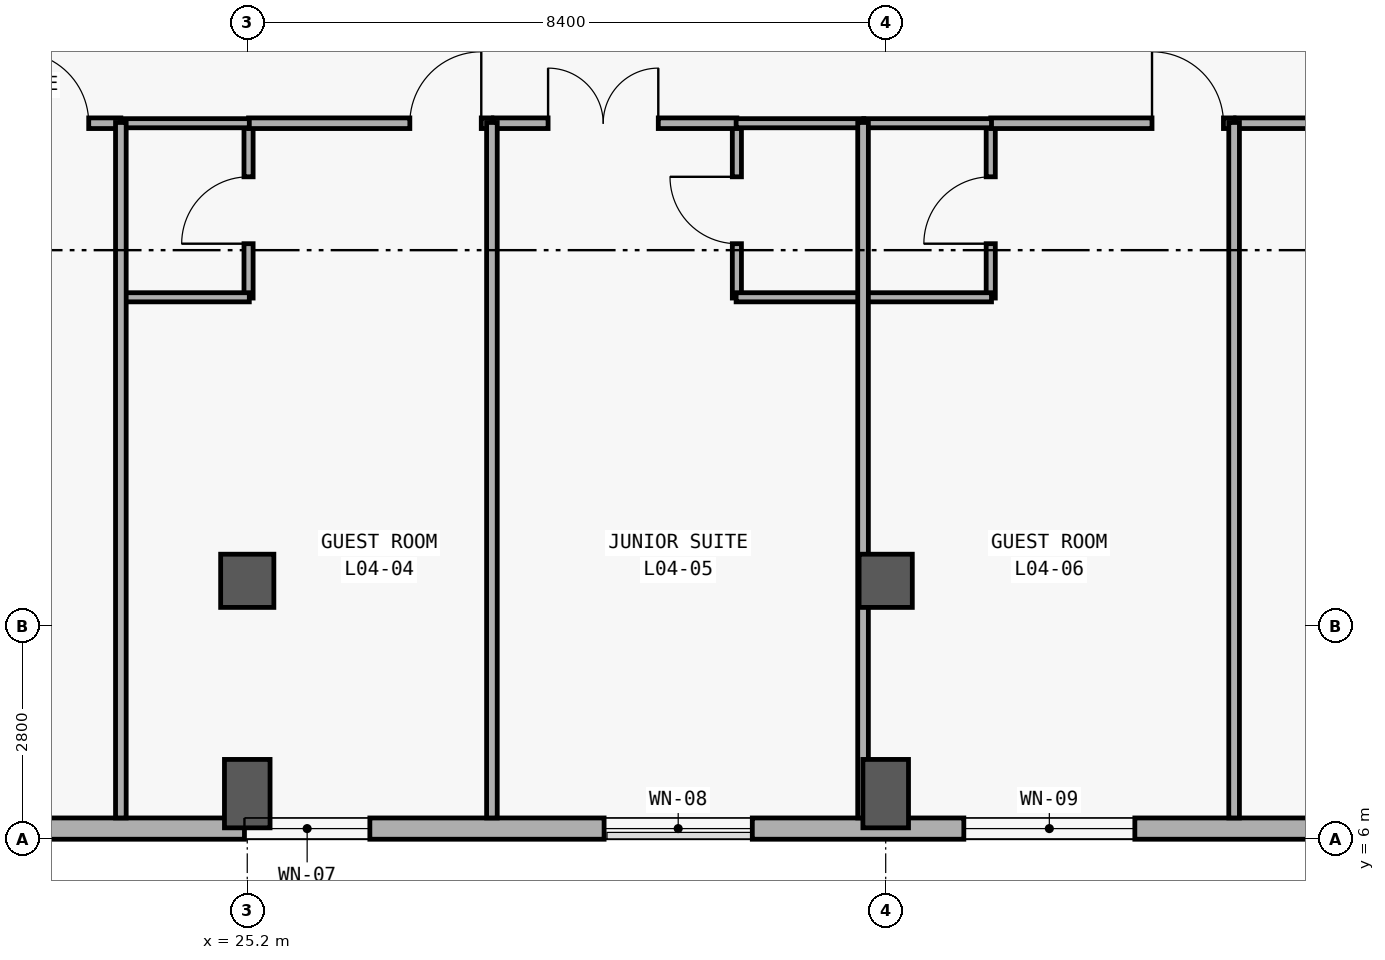
"""IFC4 building model, lengths in metres.
Left out: names, types, materials, properties, quantities, classifications, styles, units other than length and angle.
Written with IfcOpenShell. Run it as: python <this file> out.ifc"""

import sys

from ifc_helpers import new_model, si_unit, direction, frame, frame_2d, origin, origin_2d, place, context, subcontext, project, spatial, rectangle, extrude, element, fill, save


model = new_model("IFC4")
c1 = context("Model", 3, precision=1e-05, world=origin(), true_north=direction((0.0, 1.0)))
c2 = subcontext(c1, "Body", "Model", "MODEL_VIEW")
j1 = project(units=[si_unit("LENGTHUNIT", "METRE"), si_unit("PLANEANGLEUNIT", "RADIAN")], contexts=[c1])
p1 = place(None, origin())
s1 = spatial("IfcSite", under=j1, at=p1, CompositionType="ELEMENT")
p2 = place(p1, origin())
s2 = spatial("IfcBuilding", under=s1, at=p2, CompositionType="ELEMENT")
p3 = place(p2, frame((0.0, 0.0, 19.2)))
s3 = spatial("IfcBuildingStorey", under=s2, at=p3, CompositionType="ELEMENT", Elevation=19.2)
p4 = place(p3, frame((25.2, 6.6, 0.0), z_axis=(0.0, 0.0, 1.0), x_axis=(0.0, 1.0, 0.0)))
e1 = element("IfcColumn", 1, at=p4, inside=s3, PredefinedType="COLUMN", context=c2, shape_type="SweptSolid", body=[
    extrude(rectangle(XDim=0.6, YDim=0.9, at=origin_2d()), origin(), (0.0, 0.0, 1.0), 3.6),
])
p5 = place(p3, frame((25.2, 9.4, 0.0), z_axis=(0.0, 0.0, 1.0), x_axis=(1.0, 0.0, 0.0)))
e2 = element("IfcColumn", 2, at=p5, inside=s3, PredefinedType="COLUMN", context=c2, shape_type="SweptSolid", body=[
    extrude(rectangle(XDim=0.7, YDim=0.7, at=origin_2d()), origin(), (0.0, 0.0, 1.0), 3.6),
])
p6 = place(p3, frame((33.6, 6.6, 0.0), z_axis=(0.0, 0.0, 1.0), x_axis=(0.0, 1.0, 0.0)))
e3 = element("IfcColumn", 3, at=p6, inside=s3, PredefinedType="COLUMN", context=c2, shape_type="SweptSolid", body=[
    extrude(rectangle(XDim=0.6, YDim=0.9, at=origin_2d()), origin(), (0.0, 0.0, 1.0), 3.6),
])
p7 = place(p3, frame((33.6, 9.4, 0.0), z_axis=(0.0, 0.0, 1.0), x_axis=(1.0, 0.0, 0.0)))
e4 = element("IfcColumn", 4, at=p7, inside=s3, PredefinedType="COLUMN", context=c2, shape_type="SweptSolid", body=[
    extrude(rectangle(XDim=0.7, YDim=0.7, at=origin_2d()), origin(), (0.0, 0.0, 1.0), 3.6),
])
p8 = place(p3, frame((92.12, 6.14, 0.0), z_axis=(0.0, 0.0, 1.0), x_axis=(-1.0, 0.0, 0.0)))
e5 = element("IfcWall", 5, at=p8, inside=s3, PredefinedType="SOLIDWALL", context=c2, shape_type="SweptSolid", body=[
    extrude(rectangle(XDim=83.44, YDim=0.28, at=frame_2d((41.72, 0.0))), origin(), (0.0, 0.0, 1.0), 3.32),
])
p9 = place(p8, frame((79.429, 0.0, 0.85)))
e6 = element("IfcOpeningElement", 6, at=p9, cuts=e5, PredefinedType="OPENING", context=c2, shape_type="SweptSolid", body=[
    extrude(rectangle(XDim=2.7, YDim=1.85, at=frame_2d((1.35, 0.925))), frame((0.0, 0.15, 0.0), z_axis=(0.0, -1.0, 0.0), x_axis=(1.0, 0.0, 0.0)), (0.0, 0.0, 1.0), 0.3),
])
p10 = place(p8, frame((74.397, 0.0, 0.85)))
e7 = element("IfcOpeningElement", 7, at=p10, cuts=e5, PredefinedType="OPENING", context=c2, shape_type="SweptSolid", body=[
    extrude(rectangle(XDim=3.0, YDim=1.9, at=frame_2d((1.5, 0.95))), frame((0.0, 0.15, 0.0), z_axis=(0.0, -1.0, 0.0), x_axis=(1.0, 0.0, 0.0)), (0.0, 0.0, 1.0), 0.3),
])
p11 = place(p8, frame((70.264, 0.0, 0.85)))
e8 = element("IfcOpeningElement", 8, at=p11, cuts=e5, PredefinedType="OPENING", context=c2, shape_type="SweptSolid", body=[
    extrude(rectangle(XDim=1.5, YDim=1.75, at=frame_2d((0.75, 0.875))), frame((0.0, 0.15, 0.0), z_axis=(0.0, -1.0, 0.0), x_axis=(1.0, 0.0, 0.0)), (0.0, 0.0, 1.0), 0.3),
])
p12 = place(p8, frame((65.307, 0.0, 0.85)))
e9 = element("IfcOpeningElement", 9, at=p12, cuts=e5, PredefinedType="OPENING", context=c2, shape_type="SweptSolid", body=[
    extrude(rectangle(XDim=1.65, YDim=1.75, at=frame_2d((0.825, 0.875))), frame((0.0, 0.15, 0.0), z_axis=(0.0, -1.0, 0.0), x_axis=(1.0, 0.0, 0.0)), (0.0, 0.0, 1.0), 0.3),
])
p13 = place(p8, frame((60.275, 0.0, 0.85)))
e10 = element("IfcOpeningElement", 10, at=p13, cuts=e5, PredefinedType="OPENING", context=c2, shape_type="SweptSolid", body=[
    extrude(rectangle(XDim=1.95, YDim=1.75, at=frame_2d((0.975, 0.875))), frame((0.0, 0.15, 0.0), z_axis=(0.0, -1.0, 0.0), x_axis=(1.0, 0.0, 0.0)), (0.0, 0.0, 1.0), 0.3),
])
p14 = place(p8, frame((55.242, 0.0, 0.85)))
e11 = element("IfcOpeningElement", 11, at=p14, cuts=e5, PredefinedType="OPENING", context=c2, shape_type="SweptSolid", body=[
    extrude(rectangle(XDim=2.25, YDim=1.75, at=frame_2d((1.125, 0.875))), frame((0.0, 0.15, 0.0), z_axis=(0.0, -1.0, 0.0), x_axis=(1.0, 0.0, 0.0)), (0.0, 0.0, 1.0), 0.3),
])
p15 = place(p8, frame((50.21, 0.0, 0.85)))
e12 = element("IfcOpeningElement", 12, at=p15, cuts=e5, PredefinedType="OPENING", context=c2, shape_type="SweptSolid", body=[
    extrude(rectangle(XDim=2.55, YDim=1.8, at=frame_2d((1.275, 0.9))), frame((0.0, 0.15, 0.0), z_axis=(0.0, -1.0, 0.0), x_axis=(1.0, 0.0, 0.0)), (0.0, 0.0, 1.0), 0.3),
])
p16 = place(p8, frame((45.178, 0.0, 0.85)))
e13 = element("IfcOpeningElement", 13, at=p16, cuts=e5, PredefinedType="OPENING", context=c2, shape_type="SweptSolid", body=[
    extrude(rectangle(XDim=2.85, YDim=1.85, at=frame_2d((1.425, 0.925))), frame((0.0, 0.15, 0.0), z_axis=(0.0, -1.0, 0.0), x_axis=(1.0, 0.0, 0.0)), (0.0, 0.0, 1.0), 0.3),
])
p17 = place(p8, frame((40.12, 0.0, 0.85)))
e14 = element("IfcOpeningElement", 14, at=p17, cuts=e5, PredefinedType="OPENING", context=c2, shape_type="SweptSolid", body=[
    extrude(rectangle(XDim=3.2, YDim=1.95, at=frame_2d((1.6, 0.975))), frame((0.0, 0.15, 0.0), z_axis=(0.0, -1.0, 0.0), x_axis=(1.0, 0.0, 0.0)), (0.0, 0.0, 1.0), 0.3),
])
p18 = place(p8, frame((35.088, 0.0, 0.85)))
e15 = element("IfcOpeningElement", 15, at=p18, cuts=e5, PredefinedType="OPENING", context=c2, shape_type="SweptSolid", body=[
    extrude(rectangle(XDim=3.5, YDim=2.0, at=frame_2d((1.75, 1.0))), frame((0.0, 0.15, 0.0), z_axis=(0.0, -1.0, 0.0), x_axis=(1.0, 0.0, 0.0)), (0.0, 0.0, 1.0), 0.3),
])
p19 = place(p8, frame((31.255, 0.0, 0.85)))
e16 = element("IfcOpeningElement", 16, at=p19, cuts=e5, PredefinedType="OPENING", context=c2, shape_type="SweptSolid", body=[
    extrude(rectangle(XDim=1.4, YDim=1.6, at=frame_2d((0.7, 0.8))), frame((0.0, 0.15, 0.0), z_axis=(0.0, -1.0, 0.0), x_axis=(1.0, 0.0, 0.0)), (0.0, 0.0, 1.0), 0.3),
])
p20 = place(p8, frame((26.273, 0.0, 0.85)))
e17 = element("IfcOpeningElement", 17, at=p20, cuts=e5, PredefinedType="OPENING", context=c2, shape_type="SweptSolid", body=[
    extrude(rectangle(XDim=1.6, YDim=1.6, at=frame_2d((0.8, 0.8))), frame((0.0, 0.15, 0.0), z_axis=(0.0, -1.0, 0.0), x_axis=(1.0, 0.0, 0.0)), (0.0, 0.0, 1.0), 0.3),
])
p21 = place(p8, frame((21.291, 0.0, 0.85)))
e18 = element("IfcOpeningElement", 18, at=p21, cuts=e5, PredefinedType="OPENING", context=c2, shape_type="SweptSolid", body=[
    extrude(rectangle(XDim=1.8, YDim=1.6, at=frame_2d((0.9, 0.8))), frame((0.0, 0.15, 0.0), z_axis=(0.0, -1.0, 0.0), x_axis=(1.0, 0.0, 0.0)), (0.0, 0.0, 1.0), 0.3),
])
p22 = place(p8, frame((16.308, 0.0, 0.85)))
e19 = element("IfcOpeningElement", 19, at=p22, cuts=e5, PredefinedType="OPENING", context=c2, shape_type="SweptSolid", body=[
    extrude(rectangle(XDim=2.0, YDim=1.65, at=frame_2d((1.0, 0.825))), frame((0.0, 0.15, 0.0), z_axis=(0.0, -1.0, 0.0), x_axis=(1.0, 0.0, 0.0)), (0.0, 0.0, 1.0), 0.3),
])
p23 = place(p8, frame((11.326, 0.0, 0.85)))
e20 = element("IfcOpeningElement", 20, at=p23, cuts=e5, PredefinedType="OPENING", context=c2, shape_type="SweptSolid", body=[
    extrude(rectangle(XDim=2.2, YDim=1.65, at=frame_2d((1.1, 0.825))), frame((0.0, 0.15, 0.0), z_axis=(0.0, -1.0, 0.0), x_axis=(1.0, 0.0, 0.0)), (0.0, 0.0, 1.0), 0.3),
])
p24 = place(p8, frame((6.243, 0.0, 0.85)))
e21 = element("IfcOpeningElement", 21, at=p24, cuts=e5, PredefinedType="OPENING", context=c2, shape_type="SweptSolid", body=[
    extrude(rectangle(XDim=2.6, YDim=2.2, at=frame_2d((1.3, 1.1))), frame((0.0, 0.15, 0.0), z_axis=(0.0, -1.0, 0.0), x_axis=(1.0, 0.0, 0.0)), (0.0, 0.0, 1.0), 0.3),
])
p25 = place(p8, frame((1.111, 0.0, 0.85)))
e22 = element("IfcOpeningElement", 22, at=p25, cuts=e5, PredefinedType="OPENING", context=c2, shape_type="SweptSolid", body=[
    extrude(rectangle(XDim=3.1, YDim=2.2, at=frame_2d((1.55, 1.1))), frame((0.0, 0.15, 0.0), z_axis=(0.0, -1.0, 0.0), x_axis=(1.0, 0.0, 0.0)), (0.0, 0.0, 1.0), 0.3),
])
p26 = place(p3, frame((25.217, 13.12, 0.0), z_axis=(0.0, 0.0, 1.0), x_axis=(0.0, 1.0, 0.0)))
e23 = element("IfcWall", 23, at=p26, inside=s3, PredefinedType="PARTITIONING", context=c2, shape_type="SweptSolid", body=[
    extrude(rectangle(XDim=2.31, YDim=0.12, at=frame_2d((1.155, 0.0))), origin(), (0.0, 0.0, 1.0), 2.48),
])
p27 = place(p26, frame((0.715, 0.0, 0.0)))
e24 = element("IfcOpeningElement", 24, at=p27, cuts=e23, PredefinedType="OPENING", context=c2, shape_type="SweptSolid", body=[
    extrude(rectangle(XDim=0.88, YDim=2.15, at=frame_2d((0.44, 1.075))), frame((0.0, 0.07, 0.0), z_axis=(0.0, -1.0, 0.0), x_axis=(1.0, 0.0, 0.0)), (0.0, 0.0, 1.0), 0.14),
])
p28 = place(p3, frame((31.642, 13.12, 0.0), z_axis=(0.0, 0.0, 1.0), x_axis=(0.0, 1.0, 0.0)))
e25 = element("IfcWall", 25, at=p28, inside=s3, PredefinedType="PARTITIONING", context=c2, shape_type="SweptSolid", body=[
    extrude(rectangle(XDim=2.31, YDim=0.12, at=frame_2d((1.155, 0.0))), origin(), (0.0, 0.0, 1.0), 2.48),
])
p29 = place(p28, frame((0.715, 0.0, 0.0)))
e26 = element("IfcOpeningElement", 26, at=p29, cuts=e25, PredefinedType="OPENING", context=c2, shape_type="SweptSolid", body=[
    extrude(rectangle(XDim=0.88, YDim=2.15, at=frame_2d((0.44, 1.075))), frame((0.0, 0.07, 0.0), z_axis=(0.0, -1.0, 0.0), x_axis=(1.0, 0.0, 0.0)), (0.0, 0.0, 1.0), 0.14),
])
p30 = place(p3, frame((34.982, 13.12, 0.0), z_axis=(0.0, 0.0, 1.0), x_axis=(0.0, 1.0, 0.0)))
e27 = element("IfcWall", 27, at=p30, inside=s3, PredefinedType="PARTITIONING", context=c2, shape_type="SweptSolid", body=[
    extrude(rectangle(XDim=2.31, YDim=0.12, at=frame_2d((1.155, 0.0))), origin(), (0.0, 0.0, 1.0), 2.48),
])
p31 = place(p30, frame((0.715, 0.0, 0.0)))
e28 = element("IfcOpeningElement", 28, at=p31, cuts=e27, PredefinedType="OPENING", context=c2, shape_type="SweptSolid", body=[
    extrude(rectangle(XDim=0.88, YDim=2.15, at=frame_2d((0.44, 1.075))), frame((0.0, 0.07, 0.0), z_axis=(0.0, -1.0, 0.0), x_axis=(1.0, 0.0, 0.0)), (0.0, 0.0, 1.0), 0.14),
])
p32 = place(p3, frame((20.335, 15.42, 0.0), z_axis=(0.0, 0.0, 1.0), x_axis=(1.0, 0.0, 0.0)))
e29 = element("IfcWall", 29, at=p32, inside=s3, PredefinedType="PARTITIONING", context=c2, shape_type="SweptSolid", body=[
    extrude(rectangle(XDim=3.202, YDim=0.14, at=frame_2d((1.601, 0.0))), origin(), (0.0, 0.0, 1.0), 2.48),
])
p33 = place(p32, frame((1.839, 0.0, 0.0)))
e30 = element("IfcOpeningElement", 30, at=p33, cuts=e29, PredefinedType="OPENING", context=c2, shape_type="SweptSolid", body=[
    extrude(rectangle(XDim=0.94, YDim=2.2, at=frame_2d((0.47, 1.1))), frame((0.0, 0.08, 0.0), z_axis=(0.0, -1.0, 0.0), x_axis=(1.0, 0.0, 0.0)), (0.0, 0.0, 1.0), 0.16),
])
p34 = place(p3, frame((25.217, 15.42, 0.0), z_axis=(0.0, 0.0, 1.0), x_axis=(1.0, 0.0, 0.0)))
e31 = element("IfcWall", 31, at=p34, inside=s3, PredefinedType="PARTITIONING", context=c2, shape_type="SweptSolid", body=[
    extrude(rectangle(XDim=3.202, YDim=0.14, at=frame_2d((1.601, 0.0))), origin(), (0.0, 0.0, 1.0), 2.48),
])
p35 = place(p34, frame((2.122, 0.0, 0.0)))
e32 = element("IfcOpeningElement", 32, at=p35, cuts=e31, PredefinedType="OPENING", context=c2, shape_type="SweptSolid", body=[
    extrude(rectangle(XDim=0.94, YDim=2.2, at=frame_2d((0.47, 1.1))), frame((0.0, 0.08, 0.0), z_axis=(0.0, -1.0, 0.0), x_axis=(1.0, 0.0, 0.0)), (0.0, 0.0, 1.0), 0.16),
])
p36 = place(p3, frame((28.439, 15.42, 0.0), z_axis=(0.0, 0.0, 1.0), x_axis=(1.0, 0.0, 0.0)))
e33 = element("IfcWall", 33, at=p36, inside=s3, PredefinedType="PARTITIONING", context=c2, shape_type="SweptSolid", body=[
    extrude(rectangle(XDim=3.203, YDim=0.14, at=frame_2d((1.602, 0.0))), origin(), (0.0, 0.0, 1.0), 2.48),
])
p37 = place(p36, frame((0.719, 0.0, 0.0)))
e34 = element("IfcOpeningElement", 34, at=p37, cuts=e33, PredefinedType="OPENING", context=c2, shape_type="SweptSolid", body=[
    extrude(rectangle(XDim=1.45, YDim=2.3, at=frame_2d((0.725, 1.15))), frame((0.0, 0.08, 0.0), z_axis=(0.0, -1.0, 0.0), x_axis=(1.0, 0.0, 0.0)), (0.0, 0.0, 1.0), 0.16),
])
p38 = place(p3, frame((34.982, 15.42, 0.0), z_axis=(0.0, 0.0, 1.0), x_axis=(1.0, 0.0, 0.0)))
e35 = element("IfcWall", 35, at=p38, inside=s3, PredefinedType="PARTITIONING", context=c2, shape_type="SweptSolid", body=[
    extrude(rectangle(XDim=3.202, YDim=0.14, at=frame_2d((1.601, 0.0))), origin(), (0.0, 0.0, 1.0), 2.48),
])
p39 = place(p38, frame((2.122, 0.0, 0.0)))
e36 = element("IfcOpeningElement", 36, at=p39, cuts=e35, PredefinedType="OPENING", context=c2, shape_type="SweptSolid", body=[
    extrude(rectangle(XDim=0.94, YDim=2.2, at=frame_2d((0.47, 1.1))), frame((0.0, 0.08, 0.0), z_axis=(0.0, -1.0, 0.0), x_axis=(1.0, 0.0, 0.0)), (0.0, 0.0, 1.0), 0.16),
])
p40 = place(p3, frame((38.204, 15.42, 0.0), z_axis=(0.0, 0.0, 1.0), x_axis=(1.0, 0.0, 0.0)))
e37 = element("IfcWall", 37, at=p40, inside=s3, PredefinedType="PARTITIONING", context=c2, shape_type="SweptSolid", body=[
    extrude(rectangle(XDim=3.202, YDim=0.14, at=frame_2d((1.601, 0.0))), origin(), (0.0, 0.0, 1.0), 2.48),
])
p41 = place(p40, frame((0.989, 0.0, 0.0)))
e38 = element("IfcOpeningElement", 38, at=p41, cuts=e37, PredefinedType="OPENING", context=c2, shape_type="SweptSolid", body=[
    extrude(rectangle(XDim=0.94, YDim=2.2, at=frame_2d((0.47, 1.1))), frame((0.0, 0.08, 0.0), z_axis=(0.0, -1.0, 0.0), x_axis=(1.0, 0.0, 0.0)), (0.0, 0.0, 1.0), 0.16),
])
for number, where, z_axis, x_axis in (
    (39, (23.547, 13.13, 0.0), (0.0, 0.0, 1.0), (1.0, 0.0, 0.0)),
    (40, (23.547, 15.42, 0.0), (0.0, 0.0, 1.0), (1.0, 0.0, 0.0)),
    (41, (31.632, 13.13, 0.0), (0.0, 0.0, 1.0), (1.0, 0.0, 0.0)),
    (42, (31.632, 15.42, 0.0), (0.0, 0.0, 1.0), (1.0, 0.0, 0.0)),
    (43, (33.312, 13.13, 0.0), (0.0, 0.0, 1.0), (1.0, 0.0, 0.0)),
    (44, (33.312, 15.42, 0.0), (0.0, 0.0, 1.0), (1.0, 0.0, 0.0)),
):
    element("IfcWall", number, at=place(p3, frame(where, z_axis=z_axis, x_axis=x_axis)), inside=s3, PredefinedType="PARTITIONING", context=c2, shape_type="SweptSolid", body=[
        extrude(rectangle(XDim=1.68, YDim=0.12, at=frame_2d((0.84, 0.0))), origin(), (0.0, 0.0, 1.0), 2.48),
    ])
for number, where, z_axis, x_axis in (
    (45, (23.537, 6.28, 0.0), (0.0, 0.0, 1.0), (0.0, 1.0, 0.0)),
    (46, (28.419, 6.28, 0.0), (0.0, 0.0, 1.0), (0.0, 1.0, 0.0)),
    (47, (33.302, 6.28, 0.0), (0.0, 0.0, 1.0), (0.0, 1.0, 0.0)),
    (48, (38.184, 6.28, 0.0), (0.0, 0.0, 1.0), (0.0, 1.0, 0.0)),
):
    element("IfcWall", number, at=place(p3, frame(where, z_axis=z_axis, x_axis=x_axis)), inside=s3, PredefinedType="PARTITIONING", context=c2, shape_type="SweptSolid", body=[
        extrude(rectangle(XDim=9.15, YDim=0.14, at=frame_2d((4.575, 0.0))), origin(), (0.0, 0.0, 1.0), 2.48),
    ])
p42 = place(p12, origin())
e49 = element("IfcWindow", 49, at=p42, inside=s3, PartitioningType="SINGLE_PANEL", PredefinedType="WINDOW", context=c2, shape_type="SweptSolid", body=[
    extrude(rectangle(XDim=1.65, YDim=1.75, at=frame_2d((0.825, 0.875))), frame((0.0, 0.03, 0.0), z_axis=(0.0, -1.0, 0.0), x_axis=(1.0, 0.0, 0.0)), (0.0, 0.0, 1.0), 0.06),
])
fill(e9, e49)
p43 = place(p13, origin())
e50 = element("IfcWindow", 50, at=p43, inside=s3, PartitioningType="SINGLE_PANEL", PredefinedType="WINDOW", context=c2, shape_type="SweptSolid", body=[
    extrude(rectangle(XDim=1.95, YDim=1.75, at=frame_2d((0.975, 0.875))), frame((0.0, 0.03, 0.0), z_axis=(0.0, -1.0, 0.0), x_axis=(1.0, 0.0, 0.0)), (0.0, 0.0, 1.0), 0.06),
])
fill(e10, e50)
p44 = place(p14, origin())
e51 = element("IfcWindow", 51, at=p44, inside=s3, PartitioningType="SINGLE_PANEL", PredefinedType="WINDOW", context=c2, shape_type="SweptSolid", body=[
    extrude(rectangle(XDim=2.25, YDim=1.75, at=frame_2d((1.125, 0.875))), frame((0.0, 0.03, 0.0), z_axis=(0.0, -1.0, 0.0), x_axis=(1.0, 0.0, 0.0)), (0.0, 0.0, 1.0), 0.06),
])
fill(e11, e51)
p45 = place(p27, origin())
e52 = element("IfcDoor", 52, at=p45, inside=s3, OperationType="SINGLE_SWING_LEFT", PredefinedType="DOOR", context=c2, shape_type="SweptSolid", body=[
    extrude(rectangle(XDim=0.88, YDim=2.15, at=frame_2d((0.44, 1.075))), frame((0.0, 0.025, 0.0), z_axis=(0.0, -1.0, 0.0), x_axis=(1.0, 0.0, 0.0)), (0.0, 0.0, 1.0), 0.05),
])
fill(e24, e52)
p46 = place(p29, origin())
e53 = element("IfcDoor", 53, at=p46, inside=s3, OperationType="SINGLE_SWING_RIGHT", PredefinedType="DOOR", context=c2, shape_type="SweptSolid", body=[
    extrude(rectangle(XDim=0.88, YDim=2.15, at=frame_2d((0.44, 1.075))), frame((0.0, 0.025, 0.0), z_axis=(0.0, -1.0, 0.0), x_axis=(1.0, 0.0, 0.0)), (0.0, 0.0, 1.0), 0.05),
])
fill(e26, e53)
p47 = place(p31, origin())
e54 = element("IfcDoor", 54, at=p47, inside=s3, OperationType="SINGLE_SWING_LEFT", PredefinedType="DOOR", context=c2, shape_type="SweptSolid", body=[
    extrude(rectangle(XDim=0.88, YDim=2.15, at=frame_2d((0.44, 1.075))), frame((0.0, 0.025, 0.0), z_axis=(0.0, -1.0, 0.0), x_axis=(1.0, 0.0, 0.0)), (0.0, 0.0, 1.0), 0.05),
])
fill(e28, e54)
p48 = place(p33, origin())
e55 = element("IfcDoor", 55, at=p48, inside=s3, OperationType="SINGLE_SWING_LEFT", PredefinedType="DOOR", context=c2, shape_type="SweptSolid", body=[
    extrude(rectangle(XDim=0.94, YDim=2.2, at=frame_2d((0.47, 1.1))), frame((0.0, 0.025, 0.0), z_axis=(0.0, -1.0, 0.0), x_axis=(1.0, 0.0, 0.0)), (0.0, 0.0, 1.0), 0.05),
])
fill(e30, e55)
p49 = place(p35, origin())
e56 = element("IfcDoor", 56, at=p49, inside=s3, OperationType="SINGLE_SWING_RIGHT", PredefinedType="DOOR", context=c2, shape_type="SweptSolid", body=[
    extrude(rectangle(XDim=0.94, YDim=2.2, at=frame_2d((0.47, 1.1))), frame((0.0, 0.025, 0.0), z_axis=(0.0, -1.0, 0.0), x_axis=(1.0, 0.0, 0.0)), (0.0, 0.0, 1.0), 0.05),
])
fill(e32, e56)
p50 = place(p37, origin())
e57 = element("IfcDoor", 57, at=p50, inside=s3, OperationType="DOUBLE_DOOR_SINGLE_SWING", PredefinedType="DOOR", context=c2, shape_type="SweptSolid", body=[
    extrude(rectangle(XDim=1.45, YDim=2.3, at=frame_2d((0.725, 1.15))), frame((0.0, 0.025, 0.0), z_axis=(0.0, -1.0, 0.0), x_axis=(1.0, 0.0, 0.0)), (0.0, 0.0, 1.0), 0.05),
])
fill(e34, e57)
p51 = place(p39, origin())
e58 = element("IfcDoor", 58, at=p51, inside=s3, OperationType="SINGLE_SWING_LEFT", PredefinedType="DOOR", context=c2, shape_type="SweptSolid", body=[
    extrude(rectangle(XDim=0.94, YDim=2.2, at=frame_2d((0.47, 1.1))), frame((0.0, 0.025, 0.0), z_axis=(0.0, -1.0, 0.0), x_axis=(1.0, 0.0, 0.0)), (0.0, 0.0, 1.0), 0.05),
])
fill(e36, e58)
save(model, sys.argv[1])
